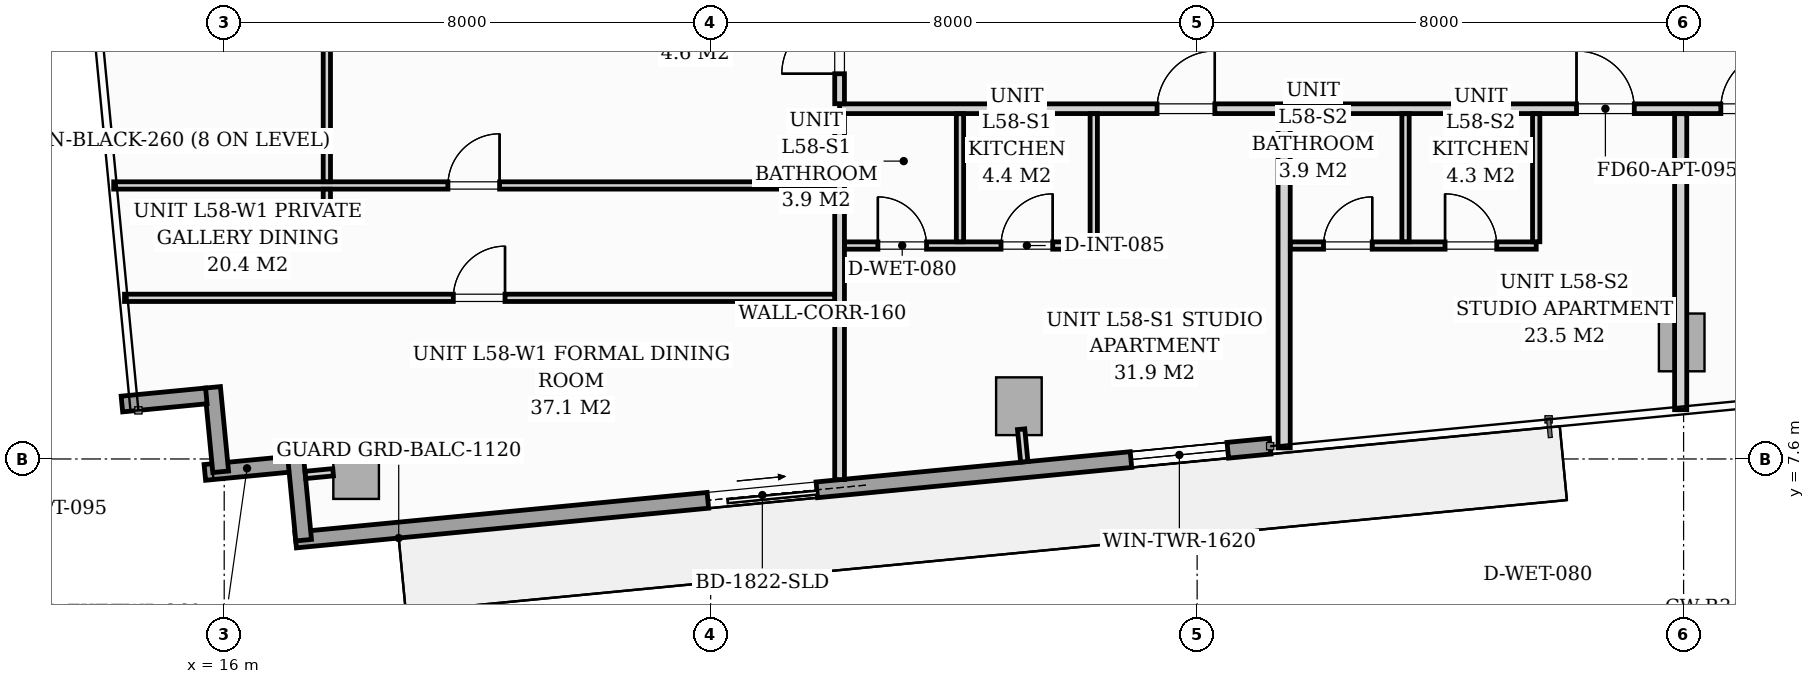
"""IFC4 building model, lengths in metres.
Left out: names, types, materials, properties, quantities, classifications, styles, units other than length and angle.
Written with IfcOpenShell. Run it as: python <this file> out.ifc"""

import sys

from ifc_helpers import new_model, si_unit, direction, frame, frame_2d, origin, origin_2d, place, context, subcontext, project, spatial, rectangle, extrude, source, transform, mapped, element, fill, save


model = new_model("IFC4")
c1 = context("Model", 3, precision=1e-05, world=origin(), true_north=direction((0.0, 1.0)))
c2 = subcontext(c1, "Body", "Model", "MODEL_VIEW")
j1 = project(units=[si_unit("LENGTHUNIT", "METRE"), si_unit("PLANEANGLEUNIT", "RADIAN")], contexts=[c1])
p1 = place(None, origin())
s1 = spatial("IfcSite", under=j1, at=p1, CompositionType="ELEMENT")
p2 = place(p1, origin())
s2 = spatial("IfcBuilding", under=s1, at=p2, CompositionType="ELEMENT")
p3 = place(p2, frame((0.0, 0.0, 201.8)))
s3 = spatial("IfcBuildingStorey", under=s2, at=p3, CompositionType="ELEMENT", Elevation=201.8)
m1 = source(origin(), c2, "Body", "SweptSolid", [
    extrude(rectangle(XDim=0.75, YDim=0.95, at=origin_2d()), origin(), (0.0, 0.0, 1.0), 3.196),
])
for number, where, z_axis, x_axis in (
    (1, (18.169, 7.418, 0.002), (0.0, 0.0, 1.0), (0.995, 0.096, 0.0)),
    (2, (29.069, 8.467, 0.002), (0.0, 0.0, 1.0), (0.995, 0.096, 0.0)),
    (3, (39.969, 9.517, 0.002), (0.0, 0.0, 1.0), (0.995, 0.096, 0.0)),
):
    element("IfcColumn", number, at=place(p3, frame(where, z_axis=z_axis, x_axis=x_axis)), inside=s3, PredefinedType="COLUMN", context=c2, shape_type="MappedRepresentation", body=[
        mapped(m1, transform((0.0, 0.0, 0.0), scale=1.0)),
    ])
p4 = place(p3, frame((17.07, 7.513, 0.0), z_axis=(0.0, 0.0, 1.0), x_axis=(-0.995391056452, -0.09589913835, 0.0)))
e4 = element("IfcWall", 4, at=p4, inside=s3, PredefinedType="STANDARD", context=c2, shape_type="SweptSolid", body=[
    extrude(rectangle(XDim=1.395, YDim=0.26, at=frame_2d((0.698, 0.0))), origin(), (0.0, 0.0, 1.0), 2.94),
])
p5 = place(p3, frame((15.942, 7.389, 0.0), z_axis=(0.0, 0.0, 1.0), x_axis=(-0.095742423056, 0.99540614245, 0.0)))
e5 = element("IfcWall", 5, at=p5, inside=s3, PredefinedType="STANDARD", context=c2, shape_type="SweptSolid", body=[
    extrude(rectangle(XDim=1.395, YDim=0.26, at=frame_2d((0.697, 0.0))), origin(), (0.0, 0.0, 1.0), 2.94),
])
p6 = place(p3, frame((15.706, 8.637, 0.0), z_axis=(0.0, 0.0, 1.0), x_axis=(-0.995391056452, -0.09589913835, 0.0)))
e6 = element("IfcWall", 6, at=p6, inside=s3, PredefinedType="STANDARD", context=c2, shape_type="SweptSolid", body=[
    extrude(rectangle(XDim=1.395, YDim=0.26, at=frame_2d((0.698, 0.0))), origin(), (0.0, 0.0, 1.0), 2.94),
])
p7 = place(p3, frame((33.201, 7.81, 0.0), z_axis=(0.0, 0.0, 1.0), x_axis=(-0.995397074604, -0.095836652014, 0.0)))
e7 = element("IfcWall", 7, at=p7, inside=s3, PredefinedType="STANDARD", context=c2, shape_type="SweptSolid", body=[
    extrude(rectangle(XDim=16.1, YDim=0.26, at=frame_2d((8.05, 0.0))), origin(), (0.0, 0.0, 1.0), 2.94),
])
p8 = place(p7, frame((7.49, 0.0, 0.0)))
e8 = element("IfcOpeningElement", 8, at=p8, cuts=e7, PredefinedType="OPENING", context=c2, shape_type="SweptSolid", body=[
    extrude(rectangle(XDim=1.8, YDim=2.06, at=frame_2d((0.9, 1.03))), frame((0.0, 0.14, 0.0), z_axis=(0.0, -1.0, 0.0), x_axis=(1.0, 0.0, 0.0)), (0.0, 0.0, 1.0), 0.28),
])
p9 = place(p7, frame((0.7, 0.0, 0.65)))
e9 = element("IfcOpeningElement", 9, at=p9, cuts=e7, PredefinedType="OPENING", context=c2, shape_type="SweptSolid", body=[
    extrude(rectangle(XDim=1.6, YDim=1.5, at=frame_2d((0.8, 0.75))), frame((0.0, 0.14, 0.0), z_axis=(0.0, -1.0, 0.0), x_axis=(1.0, 0.0, 0.0)), (0.0, 0.0, 1.0), 0.28),
])
p10 = place(p3, frame((17.306, 6.265, 0.0), z_axis=(0.0, 0.0, 1.0), x_axis=(-0.095915846097, 0.995389446633, 0.0)))
e10 = element("IfcWall", 10, at=p10, inside=s3, PredefinedType="STANDARD", context=c2, shape_type="SweptSolid", body=[
    extrude(rectangle(XDim=1.395, YDim=0.26, at=frame_2d((0.697, 0.0))), origin(), (0.0, 0.0, 1.0), 2.94),
])
p11 = place(p3, frame((26.12, 13.36, 0.0), z_axis=(0.0, 0.0, 1.0), x_axis=(1.0, 0.0, 0.0)))
e11 = element("IfcWall", 11, at=p11, inside=s3, PredefinedType="PARTITIONING", context=c2, shape_type="SweptSolid", body=[
    extrude(rectangle(XDim=19.76, YDim=0.16, at=frame_2d((9.88, 0.0))), origin(), (0.0, 0.0, 1.0), 2.94),
])
p12 = place(p11, frame((5.221, 0.0, 0.0)))
e12 = element("IfcOpeningElement", 12, at=p12, cuts=e11, PredefinedType="OPENING", context=c2, shape_type="SweptSolid", body=[
    extrude(rectangle(XDim=0.95, YDim=2.06, at=frame_2d((0.475, 1.03))), frame((0.0, 0.09, 0.0), z_axis=(0.0, -1.0, 0.0), x_axis=(1.0, 0.0, 0.0)), (0.0, 0.0, 1.0), 0.18),
])
p13 = place(p11, frame((12.119, 0.0, 0.0)))
e13 = element("IfcOpeningElement", 13, at=p13, cuts=e11, PredefinedType="OPENING", context=c2, shape_type="SweptSolid", body=[
    extrude(rectangle(XDim=0.95, YDim=2.06, at=frame_2d((0.475, 1.03))), frame((0.0, 0.09, 0.0), z_axis=(0.0, -1.0, 0.0), x_axis=(1.0, 0.0, 0.0)), (0.0, 0.0, 1.0), 0.18),
])
p14 = place(p11, frame((14.492, 0.0, 0.0)))
e14 = element("IfcOpeningElement", 14, at=p14, cuts=e11, PredefinedType="OPENING", context=c2, shape_type="SweptSolid", body=[
    extrude(rectangle(XDim=0.95, YDim=2.06, at=frame_2d((0.475, 1.03))), frame((0.0, 0.09, 0.0), z_axis=(0.0, -1.0, 0.0), x_axis=(1.0, 0.0, 0.0)), (0.0, 0.0, 1.0), 0.18),
])
p15 = place(p3, frame((26.12, 7.261, 0.0), z_axis=(0.0, 0.0, 1.0), x_axis=(0.0, 1.0, 0.0)))
e15 = element("IfcWall", 15, at=p15, inside=s3, PredefinedType="PARTITIONING", context=c2, shape_type="SweptSolid", body=[
    extrude(rectangle(XDim=6.017, YDim=0.16, at=frame_2d((3.008, 0.0))), origin(), (0.0, 0.0, 1.0), 2.94),
])
p16 = place(p3, frame((26.12, 13.442, 0.0), z_axis=(0.0, 0.0, 1.0), x_axis=(0.0, 1.0, 0.0)))
e16 = element("IfcWall", 16, at=p16, inside=s3, PredefinedType="PARTITIONING", context=c2, shape_type="SweptSolid", body=[
    extrude(rectangle(XDim=4.36, YDim=0.16, at=frame_2d((2.18, 0.0))), origin(), (0.0, 0.0, 1.0), 2.94),
])
p17 = place(p16, frame((0.493, 0.0, 0.0)))
e17 = element("IfcOpeningElement", 17, at=p17, cuts=e16, PredefinedType="OPENING", context=c2, shape_type="SweptSolid", body=[
    extrude(rectangle(XDim=0.95, YDim=2.06, at=frame_2d((0.475, 1.03))), frame((0.0, 0.09, 0.0), z_axis=(0.0, -1.0, 0.0), x_axis=(1.0, 0.0, 0.0)), (0.0, 0.0, 1.0), 0.18),
])
p18 = place(p3, frame((26.202, 11.11, 0.0), z_axis=(0.0, 0.0, 1.0), x_axis=(1.0, 0.0, 0.0)))
e18 = element("IfcWall", 18, at=p18, inside=s3, PredefinedType="PARTITIONING", context=c2, shape_type="SweptSolid", body=[
    extrude(rectangle(XDim=4.098, YDim=0.12, at=frame_2d((2.049, 0.0))), origin(), (0.0, 0.0, 1.0), 2.94),
])
p19 = place(p18, frame((0.548, 0.0, 0.0)))
e19 = element("IfcOpeningElement", 19, at=p19, cuts=e18, PredefinedType="OPENING", context=c2, shape_type="SweptSolid", body=[
    extrude(rectangle(XDim=0.8, YDim=2.02, at=frame_2d((0.4, 1.01))), frame((0.0, 0.07, 0.0), z_axis=(0.0, -1.0, 0.0), x_axis=(1.0, 0.0, 0.0)), (0.0, 0.0, 1.0), 0.14),
])
p20 = place(p18, frame((2.573, 0.0, 0.0)))
e20 = element("IfcOpeningElement", 20, at=p20, cuts=e18, PredefinedType="OPENING", context=c2, shape_type="SweptSolid", body=[
    extrude(rectangle(XDim=0.85, YDim=2.05, at=frame_2d((0.425, 1.025))), frame((0.0, 0.07, 0.0), z_axis=(0.0, -1.0, 0.0), x_axis=(1.0, 0.0, 0.0)), (0.0, 0.0, 1.0), 0.14),
])
for number, where, z_axis, x_axis in (
    (21, (30.3, 11.172, 0.0), (0.0, 0.0, 1.0), (0.0, 1.0, 0.0)),
    (22, (28.1, 11.172, 0.0), (0.0, 0.0, 1.0), (0.0, 1.0, 0.0)),
):
    element("IfcWall", number, at=place(p3, frame(where, z_axis=z_axis, x_axis=x_axis)), inside=s3, PredefinedType="PARTITIONING", context=c2, shape_type="SweptSolid", body=[
        extrude(rectangle(XDim=2.106, YDim=0.12, at=frame_2d((1.053, 0.0))), origin(), (0.0, 0.0, 1.0), 2.94),
    ])
p21 = place(p3, frame((33.431, 7.782, 0.0), z_axis=(0.0, 0.0, 1.0), x_axis=(0.0, 1.0, 0.0)))
e23 = element("IfcWall", 23, at=p21, inside=s3, PredefinedType="PARTITIONING", context=c2, shape_type="SweptSolid", body=[
    extrude(rectangle(XDim=5.496, YDim=0.2, at=frame_2d((2.748, 0.0))), origin(), (0.0, 0.0, 1.0), 2.94),
])
p22 = place(p3, frame((33.533, 11.11, 0.0), z_axis=(0.0, 0.0, 1.0), x_axis=(1.0, 0.0, 0.0)))
e24 = element("IfcWall", 24, at=p22, inside=s3, PredefinedType="PARTITIONING", context=c2, shape_type="SweptSolid", body=[
    extrude(rectangle(XDim=4.043, YDim=0.12, at=frame_2d((2.021, 0.0))), origin(), (0.0, 0.0, 1.0), 2.94),
])
p23 = place(p22, frame((0.546, 0.0, 0.0)))
e25 = element("IfcOpeningElement", 25, at=p23, cuts=e24, PredefinedType="OPENING", context=c2, shape_type="SweptSolid", body=[
    extrude(rectangle(XDim=0.8, YDim=2.02, at=frame_2d((0.4, 1.01))), frame((0.0, 0.07, 0.0), z_axis=(0.0, -1.0, 0.0), x_axis=(1.0, 0.0, 0.0)), (0.0, 0.0, 1.0), 0.14),
])
p24 = place(p22, frame((2.544, 0.0, 0.0)))
e26 = element("IfcOpeningElement", 26, at=p24, cuts=e24, PredefinedType="OPENING", context=c2, shape_type="SweptSolid", body=[
    extrude(rectangle(XDim=0.85, YDim=2.05, at=frame_2d((0.425, 1.025))), frame((0.0, 0.07, 0.0), z_axis=(0.0, -1.0, 0.0), x_axis=(1.0, 0.0, 0.0)), (0.0, 0.0, 1.0), 0.14),
])
for number, where, z_axis, x_axis in (
    (27, (37.576, 11.172, 0.0), (0.0, 0.0, 1.0), (0.0, 1.0, 0.0)),
    (28, (35.427, 11.172, 0.0), (0.0, 0.0, 1.0), (0.0, 1.0, 0.0)),
):
    element("IfcWall", number, at=place(p3, frame(where, z_axis=z_axis, x_axis=x_axis)), inside=s3, PredefinedType="PARTITIONING", context=c2, shape_type="SweptSolid", body=[
        extrude(rectangle(XDim=2.106, YDim=0.12, at=frame_2d((1.053, 0.0))), origin(), (0.0, 0.0, 1.0), 2.94),
    ])
p25 = place(p3, frame((39.952, 8.41, 0.0), z_axis=(0.0, 0.0, 1.0), x_axis=(0.0, 1.0, 0.0)))
e29 = element("IfcWall", 29, at=p25, inside=s3, PredefinedType="PARTITIONING", context=c2, shape_type="SweptSolid", body=[
    extrude(rectangle(XDim=4.868, YDim=0.2, at=frame_2d((2.434, 0.0))), origin(), (0.0, 0.0, 1.0), 2.94),
])
p26 = place(p3, frame((14.361, 10.25, 0.0), z_axis=(0.0, 0.0, 1.0), x_axis=(1.0, 0.0, 0.0)))
e30 = element("IfcWall", 30, at=p26, inside=s3, PredefinedType="PARTITIONING", context=c2, shape_type="SweptSolid", body=[
    extrude(rectangle(XDim=11.677, YDim=0.12, at=frame_2d((5.839, 0.0))), origin(), (0.0, 0.0, 1.0), 2.94),
])
p27 = place(p26, frame((5.407, 0.0, 0.0)))
e31 = element("IfcOpeningElement", 31, at=p27, cuts=e30, PredefinedType="OPENING", context=c2, shape_type="SweptSolid", body=[
    extrude(rectangle(XDim=0.85, YDim=2.05, at=frame_2d((0.425, 1.025))), frame((0.0, 0.07, 0.0), z_axis=(0.0, -1.0, 0.0), x_axis=(1.0, 0.0, 0.0)), (0.0, 0.0, 1.0), 0.14),
])
p28 = place(p3, frame((14.183, 12.098, 0.0), z_axis=(0.0, 0.0, 1.0), x_axis=(1.0, 0.0, 0.0)))
e32 = element("IfcWall", 32, at=p28, inside=s3, PredefinedType="PARTITIONING", context=c2, shape_type="SweptSolid", body=[
    extrude(rectangle(XDim=11.855, YDim=0.12, at=frame_2d((5.928, 0.0))), origin(), (0.0, 0.0, 1.0), 2.94),
])
p29 = place(p28, frame((5.496, 0.0, 0.0)))
e33 = element("IfcOpeningElement", 33, at=p29, cuts=e32, PredefinedType="OPENING", context=c2, shape_type="SweptSolid", body=[
    extrude(rectangle(XDim=0.85, YDim=2.05, at=frame_2d((0.425, 1.025))), frame((0.0, 0.07, 0.0), z_axis=(0.0, -1.0, 0.0), x_axis=(1.0, 0.0, 0.0)), (0.0, 0.0, 1.0), 0.14),
])
p30 = place(p3, frame((17.688, 11.658, 0.0), z_axis=(0.0, 0.0, 1.0), x_axis=(0.0, 1.0, 0.0)))
e34 = element("IfcWall", 34, at=p30, inside=s3, PredefinedType="PARTITIONING", context=c2, shape_type="SweptSolid", body=[
    extrude(rectangle(XDim=0.378, YDim=0.12, at=frame_2d((0.189, 0.0))), origin(), (0.0, 0.0, 1.0), 2.94),
])
p31 = place(p3, frame((17.688, 12.16, 0.0), z_axis=(0.0, 0.0, 1.0), x_axis=(0.0, 1.0, 0.0)))
e35 = element("IfcWall", 35, at=p31, inside=s3, PredefinedType="PARTITIONING", context=c2, shape_type="SweptSolid", body=[
    extrude(rectangle(XDim=8.689, YDim=0.12, at=frame_2d((4.345, 0.0))), origin(), (0.0, 0.0, 1.0), 2.94),
])
p32 = place(p31, frame((3.92, 0.0, 0.0)))
e36 = element("IfcOpeningElement", 36, at=p32, cuts=e35, PredefinedType="OPENING", context=c2, shape_type="SweptSolid", body=[
    extrude(rectangle(XDim=0.85, YDim=2.05, at=frame_2d((0.425, 1.025))), frame((0.0, 0.07, 0.0), z_axis=(0.0, -1.0, 0.0), x_axis=(1.0, 0.0, 0.0)), (0.0, 0.0, 1.0), 0.14),
])
p33 = place(p3, frame((17.791, 7.382, 0.0), z_axis=(0.0, 0.0, 1.0), x_axis=(-0.995384576284, -0.09596637586, 0.0)))
e37 = element("IfcWall", 37, at=p33, inside=s3, PredefinedType="PARTITIONING", context=c2, shape_type="SweptSolid", body=[
    extrude(rectangle(XDim=0.458, YDim=0.12, at=frame_2d((0.229, 0.0))), origin(), (0.0, 0.0, 1.0), 2.94),
])
p34 = place(p3, frame((29.105, 8.089, 0.0), z_axis=(0.0, 0.0, 1.0), x_axis=(0.095772948675, -0.995403205893, 0.0)))
e38 = element("IfcWall", 38, at=p34, inside=s3, PredefinedType="PARTITIONING", context=c2, shape_type="SweptSolid", body=[
    extrude(rectangle(XDim=0.538, YDim=0.12, at=frame_2d((0.269, 0.0))), origin(), (0.0, 0.0, 1.0), 2.94),
])
m2 = source(origin(), c2, "Body", "SweptSolid", [
    extrude(rectangle(XDim=1.8, YDim=2.06, at=frame_2d((0.9, 1.03))), frame((0.0, 0.025, 0.0), z_axis=(0.0, -1.0, 0.0), x_axis=(1.0, 0.0, 0.0)), (0.0, 0.0, 1.0), 0.05),
])
p35 = place(p8, origin())
e39 = element("IfcDoor", 39, at=p35, inside=s3, OperationType="SLIDING_TO_LEFT", PredefinedType="DOOR", context=c2, shape_type="MappedRepresentation", body=[
    mapped(m2, transform((0.0, 0.0, 0.0), scale=1.0)),
])
fill(e8, e39)
m3 = source(origin(), c2, "Body", "SweptSolid", [
    extrude(rectangle(XDim=1.6, YDim=1.5, at=frame_2d((0.8, 0.75))), frame((0.0, 0.03, 0.0), z_axis=(0.0, -1.0, 0.0), x_axis=(1.0, 0.0, 0.0)), (0.0, 0.0, 1.0), 0.06),
])
p36 = place(p9, origin())
e40 = element("IfcWindow", 40, at=p36, inside=s3, PartitioningType="SINGLE_PANEL", PredefinedType="WINDOW", context=c2, shape_type="MappedRepresentation", body=[
    mapped(m3, transform((0.0, 0.0, 0.0), scale=1.0)),
])
fill(e9, e40)
m4 = source(origin(), c2, "Body", "SweptSolid", [
    extrude(rectangle(XDim=0.95, YDim=2.06, at=frame_2d((0.475, 1.03))), frame((0.0, 0.025, 0.0), z_axis=(0.0, -1.0, 0.0), x_axis=(1.0, 0.0, 0.0)), (0.0, 0.0, 1.0), 0.05),
])
p37 = place(p12, origin())
e41 = element("IfcDoor", 41, at=p37, inside=s3, OperationType="SINGLE_SWING_RIGHT", PredefinedType="DOOR", context=c2, shape_type="MappedRepresentation", body=[
    mapped(m4, transform((0.0, 0.0, 0.0), scale=1.0)),
])
fill(e12, e41)
m5 = source(origin(), c2, "Body", "SweptSolid", [
    extrude(rectangle(XDim=0.8, YDim=2.02, at=frame_2d((0.4, 1.01))), frame((0.0, 0.025, 0.0), z_axis=(0.0, -1.0, 0.0), x_axis=(1.0, 0.0, 0.0)), (0.0, 0.0, 1.0), 0.05),
])
p38 = place(p19, origin())
e42 = element("IfcDoor", 42, at=p38, inside=s3, OperationType="SINGLE_SWING_LEFT", PredefinedType="DOOR", context=c2, shape_type="MappedRepresentation", body=[
    mapped(m5, transform((0.0, 0.0, 0.0), scale=1.0)),
])
fill(e19, e42)
m6 = source(origin(), c2, "Body", "SweptSolid", [
    extrude(rectangle(XDim=0.85, YDim=2.05, at=frame_2d((0.425, 1.025))), frame((0.0, 0.025, 0.0), z_axis=(0.0, -1.0, 0.0), x_axis=(1.0, 0.0, 0.0)), (0.0, 0.0, 1.0), 0.05),
])
p39 = place(p20, origin())
e43 = element("IfcDoor", 43, at=p39, inside=s3, OperationType="SINGLE_SWING_RIGHT", PredefinedType="DOOR", context=c2, shape_type="MappedRepresentation", body=[
    mapped(m6, transform((0.0, 0.0, 0.0), scale=1.0)),
])
fill(e20, e43)
p40 = place(p13, origin())
e44 = element("IfcDoor", 44, at=p40, inside=s3, OperationType="SINGLE_SWING_LEFT", PredefinedType="DOOR", context=c2, shape_type="MappedRepresentation", body=[
    mapped(m4, transform((0.0, 0.0, 0.0), scale=1.0)),
])
fill(e13, e44)
p41 = place(p23, origin())
e45 = element("IfcDoor", 45, at=p41, inside=s3, OperationType="SINGLE_SWING_RIGHT", PredefinedType="DOOR", context=c2, shape_type="MappedRepresentation", body=[
    mapped(m5, transform((0.0, 0.0, 0.0), scale=1.0)),
])
fill(e25, e45)
p42 = place(p24, origin())
e46 = element("IfcDoor", 46, at=p42, inside=s3, OperationType="SINGLE_SWING_LEFT", PredefinedType="DOOR", context=c2, shape_type="MappedRepresentation", body=[
    mapped(m6, transform((0.0, 0.0, 0.0), scale=1.0)),
])
fill(e26, e46)
p43 = place(p14, origin())
e47 = element("IfcDoor", 47, at=p43, inside=s3, OperationType="SINGLE_SWING_RIGHT", PredefinedType="DOOR", context=c2, shape_type="MappedRepresentation", body=[
    mapped(m4, transform((0.0, 0.0, 0.0), scale=1.0)),
])
fill(e14, e47)
p44 = place(p17, origin())
e48 = element("IfcDoor", 48, at=p44, inside=s3, OperationType="SINGLE_SWING_LEFT", PredefinedType="DOOR", context=c2, shape_type="MappedRepresentation", body=[
    mapped(m4, transform((0.0, 0.0, 0.0), scale=1.0)),
])
fill(e17, e48)
p45 = place(p27, origin())
e49 = element("IfcDoor", 49, at=p45, inside=s3, OperationType="SINGLE_SWING_RIGHT", PredefinedType="DOOR", context=c2, shape_type="MappedRepresentation", body=[
    mapped(m6, transform((0.0, 0.0, 0.0), scale=1.0)),
])
fill(e31, e49)
p46 = place(p29, origin())
e50 = element("IfcDoor", 50, at=p46, inside=s3, OperationType="SINGLE_SWING_RIGHT", PredefinedType="DOOR", context=c2, shape_type="MappedRepresentation", body=[
    mapped(m6, transform((0.0, 0.0, 0.0), scale=1.0)),
])
fill(e33, e50)
save(model, sys.argv[1])
